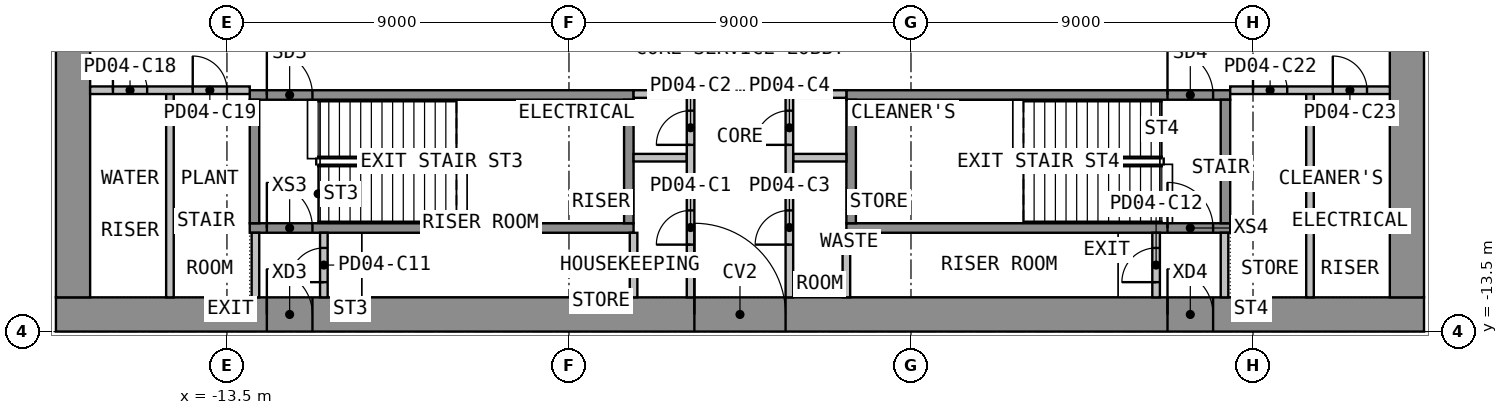
"""IFC4 building model, lengths in metres.
Left out: names, types, materials, properties, quantities, classifications, styles, units other than length and angle.
Written with IfcOpenShell. Run it as: python <this file> out.ifc"""

import sys

from ifc_helpers import new_model, si_unit, direction, frame, frame_2d, origin, place, context, subcontext, project, spatial, rectangle, extrude, element, fill, save


model = new_model("IFC4")
c1 = context("Model", 3, precision=1e-05, world=origin(), true_north=direction((0.0, 1.0)))
c2 = subcontext(c1, "Body", "Model", "MODEL_VIEW")
j1 = project(units=[si_unit("LENGTHUNIT", "METRE"), si_unit("PLANEANGLEUNIT", "RADIAN")], contexts=[c1])
p1 = place(None, origin())
s1 = spatial("IfcSite", under=j1, at=p1, CompositionType="ELEMENT")
p2 = place(p1, origin())
s2 = spatial("IfcBuilding", under=s1, at=p2, CompositionType="ELEMENT")
p3 = place(p2, frame((0.0, 0.0, 20.4)))
s3 = spatial("IfcBuildingStorey", under=s2, at=p3, CompositionType="ELEMENT", Elevation=20.4)
p4 = place(p3, frame((-18.0, -13.05, 0.0), z_axis=(0.0, 0.0, 1.0), x_axis=(1.0, 0.0, 0.0)))
e1 = element("IfcWall", 1, at=p4, inside=s3, PredefinedType="SHEAR", context=c2, shape_type="SweptSolid", body=[
    extrude(rectangle(XDim=36.0, YDim=0.9, at=frame_2d((18.0, 0.0))), origin(), (0.0, 0.0, 1.0), 4.4),
])
p5 = place(p4, frame((16.8, 0.0, 0.0)))
e2 = element("IfcOpeningElement", 2, at=p5, cuts=e1, PredefinedType="OPENING", context=c2, shape_type="SweptSolid", body=[
    extrude(rectangle(XDim=2.4, YDim=2.1, at=frame_2d((1.2, 1.05))), frame((0.0, 0.46, 0.0), z_axis=(0.0, -1.0, 0.0), x_axis=(1.0, 0.0, 0.0)), (0.0, 0.0, 1.0), 0.92),
])
p6 = place(p4, frame((5.55, 0.0, 0.0)))
e3 = element("IfcOpeningElement", 3, at=p6, cuts=e1, PredefinedType="OPENING", context=c2, shape_type="SweptSolid", body=[
    extrude(rectangle(XDim=1.2, YDim=2.1, at=frame_2d((0.6, 1.05))), frame((0.0, 0.46, 0.0), z_axis=(0.0, -1.0, 0.0), x_axis=(1.0, 0.0, 0.0)), (0.0, 0.0, 1.0), 0.92),
])
p7 = place(p4, frame((29.25, 0.0, 0.0)))
e4 = element("IfcOpeningElement", 4, at=p7, cuts=e1, PredefinedType="OPENING", context=c2, shape_type="SweptSolid", body=[
    extrude(rectangle(XDim=1.2, YDim=2.1, at=frame_2d((0.6, 1.05))), frame((0.0, 0.46, 0.0), z_axis=(0.0, -1.0, 0.0), x_axis=(1.0, 0.0, 0.0)), (0.0, 0.0, 1.0), 0.92),
])
p8 = place(p3, frame((-17.55, -12.6, 0.0), z_axis=(0.0, 0.0, 1.0), x_axis=(0.0, 1.0, 0.0)))
e5 = element("IfcWall", 5, at=p8, inside=s3, PredefinedType="SHEAR", context=c2, shape_type="SweptSolid", body=[
    extrude(rectangle(XDim=25.2, YDim=0.9, at=frame_2d((12.6, 0.0))), origin(), (0.0, 0.0, 1.0), 4.4),
])
p9 = place(p8, frame((11.4, 0.0, 0.0)))
e6 = element("IfcOpeningElement", 6, at=p9, cuts=e5, PredefinedType="OPENING", context=c2, shape_type="SweptSolid", body=[
    extrude(rectangle(XDim=2.4, YDim=2.1, at=frame_2d((1.2, 1.05))), frame((0.0, 0.46, 0.0), z_axis=(0.0, -1.0, 0.0), x_axis=(1.0, 0.0, 0.0)), (0.0, 0.0, 1.0), 0.92),
])
p10 = place(p3, frame((17.55, -12.6, 0.0), z_axis=(0.0, 0.0, 1.0), x_axis=(0.0, 1.0, 0.0)))
e7 = element("IfcWall", 7, at=p10, inside=s3, PredefinedType="SHEAR", context=c2, shape_type="SweptSolid", body=[
    extrude(rectangle(XDim=25.2, YDim=0.9, at=frame_2d((12.6, 0.0))), origin(), (0.0, 0.0, 1.0), 4.4),
])
p11 = place(p10, frame((11.4, 0.0, 0.0)))
e8 = element("IfcOpeningElement", 8, at=p11, cuts=e7, PredefinedType="OPENING", context=c2, shape_type="SweptSolid", body=[
    extrude(rectangle(XDim=2.4, YDim=2.1, at=frame_2d((1.2, 1.05))), frame((0.0, 0.46, 0.0), z_axis=(0.0, -1.0, 0.0), x_axis=(1.0, 0.0, 0.0)), (0.0, 0.0, 1.0), 0.92),
])
p12 = place(p3, frame((-12.9, -10.775, 0.0), z_axis=(0.0, 0.0, 1.0), x_axis=(1.0, 0.0, 0.0)))
e9 = element("IfcWall", 9, at=p12, inside=s3, PredefinedType="SHEAR", context=c2, shape_type="SweptSolid", body=[
    extrude(rectangle(XDim=10.1, YDim=0.25, at=frame_2d((5.05, 0.0))), origin(), (0.0, 0.0, 1.0), 4.4),
])
p13 = place(p12, frame((0.45, 0.0, 0.0)))
e10 = element("IfcOpeningElement", 10, at=p13, cuts=e9, PredefinedType="OPENING", context=c2, shape_type="SweptSolid", body=[
    extrude(rectangle(XDim=1.2, YDim=2.1, at=frame_2d((0.6, 1.05))), frame((0.0, 0.135, 0.0), z_axis=(0.0, -1.0, 0.0), x_axis=(1.0, 0.0, 0.0)), (0.0, 0.0, 1.0), 0.27),
])
p14 = place(p3, frame((-12.9, -7.275, 0.0), z_axis=(0.0, 0.0, 1.0), x_axis=(1.0, 0.0, 0.0)))
e11 = element("IfcWall", 11, at=p14, inside=s3, PredefinedType="SHEAR", context=c2, shape_type="SweptSolid", body=[
    extrude(rectangle(XDim=10.1, YDim=0.25, at=frame_2d((5.05, 0.0))), origin(), (0.0, 0.0, 1.0), 4.4),
])
p15 = place(p14, frame((0.45, 0.0, 0.0)))
e12 = element("IfcOpeningElement", 12, at=p15, cuts=e11, PredefinedType="OPENING", context=c2, shape_type="SweptSolid", body=[
    extrude(rectangle(XDim=1.2, YDim=2.1, at=frame_2d((0.6, 1.05))), frame((0.0, 0.135, 0.0), z_axis=(0.0, -1.0, 0.0), x_axis=(1.0, 0.0, 0.0)), (0.0, 0.0, 1.0), 0.27),
])
for number, where, z_axis, x_axis in (
    (13, (-12.775, -10.65, 0.0), (0.0, 0.0, 1.0), (0.0, 1.0, 0.0)),
    (14, (-2.925, -10.65, 0.0), (0.0, 0.0, 1.0), (0.0, 1.0, 0.0)),
):
    element("IfcWall", number, at=place(p3, frame(where, z_axis=z_axis, x_axis=x_axis)), inside=s3, PredefinedType="SHEAR", context=c2, shape_type="SweptSolid", body=[
        extrude(rectangle(XDim=3.25, YDim=0.25, at=frame_2d((1.625, 0.0))), origin(), (0.0, 0.0, 1.0), 4.4),
    ])
p16 = place(p3, frame((2.8, -10.775, 0.0), z_axis=(0.0, 0.0, 1.0), x_axis=(1.0, 0.0, 0.0)))
e15 = element("IfcWall", 15, at=p16, inside=s3, PredefinedType="SHEAR", context=c2, shape_type="SweptSolid", body=[
    extrude(rectangle(XDim=10.1, YDim=0.25, at=frame_2d((5.05, 0.0))), origin(), (0.0, 0.0, 1.0), 4.4),
])
p17 = place(p16, frame((8.45, 0.0, 0.0)))
e16 = element("IfcOpeningElement", 16, at=p17, cuts=e15, PredefinedType="OPENING", context=c2, shape_type="SweptSolid", body=[
    extrude(rectangle(XDim=1.2, YDim=2.1, at=frame_2d((0.6, 1.05))), frame((0.0, 0.135, 0.0), z_axis=(0.0, -1.0, 0.0), x_axis=(1.0, 0.0, 0.0)), (0.0, 0.0, 1.0), 0.27),
])
p18 = place(p3, frame((2.8, -7.275, 0.0), z_axis=(0.0, 0.0, 1.0), x_axis=(1.0, 0.0, 0.0)))
e17 = element("IfcWall", 17, at=p18, inside=s3, PredefinedType="SHEAR", context=c2, shape_type="SweptSolid", body=[
    extrude(rectangle(XDim=10.1, YDim=0.25, at=frame_2d((5.05, 0.0))), origin(), (0.0, 0.0, 1.0), 4.4),
])
p19 = place(p18, frame((8.45, 0.0, 0.0)))
e18 = element("IfcOpeningElement", 18, at=p19, cuts=e17, PredefinedType="OPENING", context=c2, shape_type="SweptSolid", body=[
    extrude(rectangle(XDim=1.2, YDim=2.1, at=frame_2d((0.6, 1.05))), frame((0.0, 0.135, 0.0), z_axis=(0.0, -1.0, 0.0), x_axis=(1.0, 0.0, 0.0)), (0.0, 0.0, 1.0), 0.27),
])
for number, where, z_axis, x_axis in (
    (19, (2.925, -10.65, 0.0), (0.0, 0.0, 1.0), (0.0, 1.0, 0.0)),
    (20, (12.775, -10.65, 0.0), (0.0, 0.0, 1.0), (0.0, 1.0, 0.0)),
):
    element("IfcWall", number, at=place(p3, frame(where, z_axis=z_axis, x_axis=x_axis)), inside=s3, PredefinedType="SHEAR", context=c2, shape_type="SweptSolid", body=[
        extrude(rectangle(XDim=3.25, YDim=0.25, at=frame_2d((1.625, 0.0))), origin(), (0.0, 0.0, 1.0), 4.4),
    ])
for number, where, z_axis, x_axis in (
    (21, (-2.8, -7.25, 0.0), (0.0, 0.0, 1.0), (1.0, 0.0, 0.0)),
    (22, (-2.8, -8.925, 0.0), (0.0, 0.0, 1.0), (1.0, 0.0, 0.0)),
    (23, (1.4, -7.25, 0.0), (0.0, 0.0, 1.0), (1.0, 0.0, 0.0)),
    (24, (1.4, -8.925, 0.0), (0.0, 0.0, 1.0), (1.0, 0.0, 0.0)),
):
    element("IfcWall", number, at=place(p3, frame(where, z_axis=z_axis, x_axis=x_axis)), inside=s3, PredefinedType="PARTITIONING", context=c2, shape_type="SweptSolid", body=[
        extrude(rectangle(XDim=1.4, YDim=0.2, at=frame_2d((0.7, 0.0))), origin(), (0.0, 0.0, 1.0), 4.4),
    ])
p20 = place(p3, frame((-1.3, -12.6, 0.0), z_axis=(0.0, 0.0, 1.0), x_axis=(0.0, 1.0, 0.0)))
e25 = element("IfcWall", 25, at=p20, inside=s3, PredefinedType="PARTITIONING", context=c2, shape_type="SweptSolid", body=[
    extrude(rectangle(XDim=5.45, YDim=0.2, at=frame_2d((2.725, 0.0))), origin(), (0.0, 0.0, 1.0), 4.4),
])
p21 = place(p20, frame((1.387, 0.0, 0.0)))
e26 = element("IfcOpeningElement", 26, at=p21, cuts=e25, PredefinedType="OPENING", context=c2, shape_type="SweptSolid", body=[
    extrude(rectangle(XDim=0.9, YDim=2.1, at=frame_2d((0.45, 1.05))), frame((0.0, 0.11, 0.0), z_axis=(0.0, -1.0, 0.0), x_axis=(1.0, 0.0, 0.0)), (0.0, 0.0, 1.0), 0.22),
])
p22 = place(p20, frame((4.012, 0.0, 0.0)))
e27 = element("IfcOpeningElement", 27, at=p22, cuts=e25, PredefinedType="OPENING", context=c2, shape_type="SweptSolid", body=[
    extrude(rectangle(XDim=0.9, YDim=2.1, at=frame_2d((0.45, 1.05))), frame((0.0, 0.11, 0.0), z_axis=(0.0, -1.0, 0.0), x_axis=(1.0, 0.0, 0.0)), (0.0, 0.0, 1.0), 0.22),
])
p23 = place(p3, frame((1.3, -12.6, 0.0), z_axis=(0.0, 0.0, 1.0), x_axis=(0.0, 1.0, 0.0)))
e28 = element("IfcWall", 28, at=p23, inside=s3, PredefinedType="PARTITIONING", context=c2, shape_type="SweptSolid", body=[
    extrude(rectangle(XDim=5.45, YDim=0.2, at=frame_2d((2.725, 0.0))), origin(), (0.0, 0.0, 1.0), 4.4),
])
p24 = place(p23, frame((1.387, 0.0, 0.0)))
e29 = element("IfcOpeningElement", 29, at=p24, cuts=e28, PredefinedType="OPENING", context=c2, shape_type="SweptSolid", body=[
    extrude(rectangle(XDim=0.9, YDim=2.1, at=frame_2d((0.45, 1.05))), frame((0.0, 0.11, 0.0), z_axis=(0.0, -1.0, 0.0), x_axis=(1.0, 0.0, 0.0)), (0.0, 0.0, 1.0), 0.22),
])
p25 = place(p23, frame((4.012, 0.0, 0.0)))
e30 = element("IfcOpeningElement", 30, at=p25, cuts=e28, PredefinedType="OPENING", context=c2, shape_type="SweptSolid", body=[
    extrude(rectangle(XDim=0.9, YDim=2.1, at=frame_2d((0.45, 1.05))), frame((0.0, 0.11, 0.0), z_axis=(0.0, -1.0, 0.0), x_axis=(1.0, 0.0, 0.0)), (0.0, 0.0, 1.0), 0.22),
])
p26 = place(p3, frame((-12.75, -12.6, 0.0), z_axis=(0.0, 0.0, 1.0), x_axis=(0.0, 1.0, 0.0)))
e31 = element("IfcWall", 31, at=p26, inside=s3, PredefinedType="PARTITIONING", context=c2, shape_type="SweptSolid", body=[
    extrude(rectangle(XDim=1.7, YDim=0.2, at=frame_2d((0.85, 0.0))), origin(), (0.0, 0.0, 1.0), 4.4),
])
p27 = place(p3, frame((-10.95, -12.6, 0.0), z_axis=(0.0, 0.0, 1.0), x_axis=(0.0, 1.0, 0.0)))
e32 = element("IfcWall", 32, at=p27, inside=s3, PredefinedType="PARTITIONING", context=c2, shape_type="SweptSolid", body=[
    extrude(rectangle(XDim=1.7, YDim=0.2, at=frame_2d((0.85, 0.0))), origin(), (0.0, 0.0, 1.0), 4.4),
])
p28 = place(p27, frame((0.4, 0.0, 0.0)))
e33 = element("IfcOpeningElement", 33, at=p28, cuts=e32, PredefinedType="OPENING", context=c2, shape_type="SweptSolid", body=[
    extrude(rectangle(XDim=0.9, YDim=2.1, at=frame_2d((0.45, 1.05))), frame((0.0, 0.11, 0.0), z_axis=(0.0, -1.0, 0.0), x_axis=(1.0, 0.0, 0.0)), (0.0, 0.0, 1.0), 0.22),
])
p29 = place(p3, frame((12.75, -12.6, 0.0), z_axis=(0.0, 0.0, 1.0), x_axis=(0.0, 1.0, 0.0)))
e34 = element("IfcWall", 34, at=p29, inside=s3, PredefinedType="PARTITIONING", context=c2, shape_type="SweptSolid", body=[
    extrude(rectangle(XDim=1.7, YDim=0.2, at=frame_2d((0.85, 0.0))), origin(), (0.0, 0.0, 1.0), 4.4),
])
p30 = place(p3, frame((10.95, -12.6, 0.0), z_axis=(0.0, 0.0, 1.0), x_axis=(0.0, 1.0, 0.0)))
e35 = element("IfcWall", 35, at=p30, inside=s3, PredefinedType="PARTITIONING", context=c2, shape_type="SweptSolid", body=[
    extrude(rectangle(XDim=1.7, YDim=0.2, at=frame_2d((0.85, 0.0))), origin(), (0.0, 0.0, 1.0), 4.4),
])
p31 = place(p30, frame((0.4, 0.0, 0.0)))
e36 = element("IfcOpeningElement", 36, at=p31, cuts=e35, PredefinedType="OPENING", context=c2, shape_type="SweptSolid", body=[
    extrude(rectangle(XDim=0.9, YDim=2.1, at=frame_2d((0.45, 1.05))), frame((0.0, 0.11, 0.0), z_axis=(0.0, -1.0, 0.0), x_axis=(1.0, 0.0, 0.0)), (0.0, 0.0, 1.0), 0.22),
])
p32 = place(p3, frame((-15.0, -12.6, 0.0), z_axis=(0.0, 0.0, 1.0), x_axis=(0.0, 1.0, 0.0)))
e37 = element("IfcWall", 37, at=p32, inside=s3, PredefinedType="PARTITIONING", context=c2, shape_type="SweptSolid", body=[
    extrude(rectangle(XDim=5.45, YDim=0.2, at=frame_2d((2.725, 0.0))), origin(), (0.0, 0.0, 1.0), 4.4),
])
p33 = place(p3, frame((-17.1, -7.15, 0.0), z_axis=(0.0, 0.0, 1.0), x_axis=(1.0, 0.0, 0.0)))
e38 = element("IfcWall", 38, at=p33, inside=s3, PredefinedType="PARTITIONING", context=c2, shape_type="SweptSolid", body=[
    extrude(rectangle(XDim=4.2, YDim=0.2, at=frame_2d((2.1, 0.0))), origin(), (0.0, 0.0, 1.0), 4.4),
])
p34 = place(p33, frame((0.6, 0.0, 0.0)))
e39 = element("IfcOpeningElement", 39, at=p34, cuts=e38, PredefinedType="OPENING", context=c2, shape_type="SweptSolid", body=[
    extrude(rectangle(XDim=0.9, YDim=2.1, at=frame_2d((0.45, 1.05))), frame((0.0, 0.11, 0.0), z_axis=(0.0, -1.0, 0.0), x_axis=(1.0, 0.0, 0.0)), (0.0, 0.0, 1.0), 0.22),
])
p35 = place(p33, frame((2.7, 0.0, 0.0)))
e40 = element("IfcOpeningElement", 40, at=p35, cuts=e38, PredefinedType="OPENING", context=c2, shape_type="SweptSolid", body=[
    extrude(rectangle(XDim=0.9, YDim=2.1, at=frame_2d((0.45, 1.05))), frame((0.0, 0.11, 0.0), z_axis=(0.0, -1.0, 0.0), x_axis=(1.0, 0.0, 0.0)), (0.0, 0.0, 1.0), 0.22),
])
p36 = place(p3, frame((15.0, -12.6, 0.0), z_axis=(0.0, 0.0, 1.0), x_axis=(0.0, 1.0, 0.0)))
e41 = element("IfcWall", 41, at=p36, inside=s3, PredefinedType="PARTITIONING", context=c2, shape_type="SweptSolid", body=[
    extrude(rectangle(XDim=5.45, YDim=0.2, at=frame_2d((2.725, 0.0))), origin(), (0.0, 0.0, 1.0), 4.4),
])
p37 = place(p3, frame((12.9, -7.15, 0.0), z_axis=(0.0, 0.0, 1.0), x_axis=(1.0, 0.0, 0.0)))
e42 = element("IfcWall", 42, at=p37, inside=s3, PredefinedType="PARTITIONING", context=c2, shape_type="SweptSolid", body=[
    extrude(rectangle(XDim=4.2, YDim=0.2, at=frame_2d((2.1, 0.0))), origin(), (0.0, 0.0, 1.0), 4.4),
])
p38 = place(p37, frame((0.6, 0.0, 0.0)))
e43 = element("IfcOpeningElement", 43, at=p38, cuts=e42, PredefinedType="OPENING", context=c2, shape_type="SweptSolid", body=[
    extrude(rectangle(XDim=0.9, YDim=2.1, at=frame_2d((0.45, 1.05))), frame((0.0, 0.11, 0.0), z_axis=(0.0, -1.0, 0.0), x_axis=(1.0, 0.0, 0.0)), (0.0, 0.0, 1.0), 0.22),
])
p39 = place(p37, frame((2.7, 0.0, 0.0)))
e44 = element("IfcOpeningElement", 44, at=p39, cuts=e42, PredefinedType="OPENING", context=c2, shape_type="SweptSolid", body=[
    extrude(rectangle(XDim=0.9, YDim=2.1, at=frame_2d((0.45, 1.05))), frame((0.0, 0.11, 0.0), z_axis=(0.0, -1.0, 0.0), x_axis=(1.0, 0.0, 0.0)), (0.0, 0.0, 1.0), 0.22),
])
for number, where, z_axis, x_axis in (
    (45, (-2.8, -12.599, 0.0), (0.0, 0.0, 1.0), (0.0, 1.0, 0.0)),
    (46, (2.8, -10.901, 0.0), (0.0, 0.0, 1.0), (0.0, -1.0, 0.0)),
):
    element("IfcWall", number, at=place(p3, frame(where, z_axis=z_axis, x_axis=x_axis)), inside=s3, PredefinedType="PARTITIONING", context=c2, shape_type="SweptSolid", body=[
        extrude(rectangle(XDim=1.698, YDim=0.2, at=frame_2d((0.849, 0.0))), origin(), (0.0, 0.0, 1.0), 4.4),
    ])
p40 = place(p5, origin())
e47 = element("IfcDoor", 47, at=p40, inside=s3, OperationType="DOUBLE_DOOR_DOUBLE_SWING", PredefinedType="DOOR", context=c2, shape_type="SweptSolid", body=[
    extrude(rectangle(XDim=2.4, YDim=2.1, at=frame_2d((1.2, 1.05))), frame((0.0, 0.025, 0.0), z_axis=(0.0, -1.0, 0.0), x_axis=(1.0, 0.0, 0.0)), (0.0, 0.0, 1.0), 0.05),
])
fill(e2, e47)
p41 = place(p6, origin())
e48 = element("IfcDoor", 48, at=p41, inside=s3, OperationType="SINGLE_SWING_RIGHT", PredefinedType="DOOR", context=c2, shape_type="SweptSolid", body=[
    extrude(rectangle(XDim=1.2, YDim=2.1, at=frame_2d((0.6, 1.05))), frame((0.0, 0.025, 0.0), z_axis=(0.0, -1.0, 0.0), x_axis=(1.0, 0.0, 0.0)), (0.0, 0.0, 1.0), 0.05),
])
fill(e3, e48)
p42 = place(p7, origin())
e49 = element("IfcDoor", 49, at=p42, inside=s3, OperationType="SINGLE_SWING_RIGHT", PredefinedType="DOOR", context=c2, shape_type="SweptSolid", body=[
    extrude(rectangle(XDim=1.2, YDim=2.1, at=frame_2d((0.6, 1.05))), frame((0.0, 0.025, 0.0), z_axis=(0.0, -1.0, 0.0), x_axis=(1.0, 0.0, 0.0)), (0.0, 0.0, 1.0), 0.05),
])
fill(e4, e49)
p43 = place(p15, origin())
e50 = element("IfcDoor", 50, at=p43, inside=s3, OperationType="SINGLE_SWING_LEFT", PredefinedType="DOOR", context=c2, shape_type="SweptSolid", body=[
    extrude(rectangle(XDim=1.2, YDim=2.1, at=frame_2d((0.6, 1.05))), frame((0.0, 0.025, 0.0), z_axis=(0.0, -1.0, 0.0), x_axis=(1.0, 0.0, 0.0)), (0.0, 0.0, 1.0), 0.05),
])
fill(e12, e50)
p44 = place(p19, origin())
e51 = element("IfcDoor", 51, at=p44, inside=s3, OperationType="SINGLE_SWING_LEFT", PredefinedType="DOOR", context=c2, shape_type="SweptSolid", body=[
    extrude(rectangle(XDim=1.2, YDim=2.1, at=frame_2d((0.6, 1.05))), frame((0.0, 0.025, 0.0), z_axis=(0.0, -1.0, 0.0), x_axis=(1.0, 0.0, 0.0)), (0.0, 0.0, 1.0), 0.05),
])
fill(e18, e51)
p45 = place(p21, origin())
e52 = element("IfcDoor", 52, at=p45, inside=s3, OperationType="SINGLE_SWING_LEFT", PredefinedType="DOOR", context=c2, shape_type="SweptSolid", body=[
    extrude(rectangle(XDim=0.9, YDim=2.1, at=frame_2d((0.45, 1.05))), frame((0.0, 0.025, 0.0), z_axis=(0.0, -1.0, 0.0), x_axis=(1.0, 0.0, 0.0)), (0.0, 0.0, 1.0), 0.05),
])
fill(e26, e52)
p46 = place(p22, origin())
e53 = element("IfcDoor", 53, at=p46, inside=s3, OperationType="SINGLE_SWING_LEFT", PredefinedType="DOOR", context=c2, shape_type="SweptSolid", body=[
    extrude(rectangle(XDim=0.9, YDim=2.1, at=frame_2d((0.45, 1.05))), frame((0.0, 0.025, 0.0), z_axis=(0.0, -1.0, 0.0), x_axis=(1.0, 0.0, 0.0)), (0.0, 0.0, 1.0), 0.05),
])
fill(e27, e53)
p47 = place(p24, origin())
e54 = element("IfcDoor", 54, at=p47, inside=s3, OperationType="SINGLE_SWING_LEFT", PredefinedType="DOOR", context=c2, shape_type="SweptSolid", body=[
    extrude(rectangle(XDim=0.9, YDim=2.1, at=frame_2d((0.45, 1.05))), frame((0.0, 0.025, 0.0), z_axis=(0.0, -1.0, 0.0), x_axis=(1.0, 0.0, 0.0)), (0.0, 0.0, 1.0), 0.05),
])
fill(e29, e54)
p48 = place(p25, origin())
e55 = element("IfcDoor", 55, at=p48, inside=s3, OperationType="SINGLE_SWING_LEFT", PredefinedType="DOOR", context=c2, shape_type="SweptSolid", body=[
    extrude(rectangle(XDim=0.9, YDim=2.1, at=frame_2d((0.45, 1.05))), frame((0.0, 0.025, 0.0), z_axis=(0.0, -1.0, 0.0), x_axis=(1.0, 0.0, 0.0)), (0.0, 0.0, 1.0), 0.05),
])
fill(e30, e55)
p49 = place(p13, origin())
e56 = element("IfcDoor", 56, at=p49, inside=s3, OperationType="SINGLE_SWING_RIGHT", PredefinedType="DOOR", context=c2, shape_type="SweptSolid", body=[
    extrude(rectangle(XDim=1.2, YDim=2.1, at=frame_2d((0.6, 1.05))), frame((0.0, 0.025, 0.0), z_axis=(0.0, -1.0, 0.0), x_axis=(1.0, 0.0, 0.0)), (0.0, 0.0, 1.0), 0.05),
])
fill(e10, e56)
p50 = place(p28, origin())
e57 = element("IfcDoor", 57, at=p50, inside=s3, OperationType="SINGLE_SWING_LEFT", PredefinedType="DOOR", context=c2, shape_type="SweptSolid", body=[
    extrude(rectangle(XDim=0.9, YDim=2.1, at=frame_2d((0.45, 1.05))), frame((0.0, 0.025, 0.0), z_axis=(0.0, -1.0, 0.0), x_axis=(1.0, 0.0, 0.0)), (0.0, 0.0, 1.0), 0.05),
])
fill(e33, e57)
p51 = place(p17, origin())
e58 = element("IfcDoor", 58, at=p51, inside=s3, OperationType="SINGLE_SWING_RIGHT", PredefinedType="DOOR", context=c2, shape_type="SweptSolid", body=[
    extrude(rectangle(XDim=1.2, YDim=2.1, at=frame_2d((0.6, 1.05))), frame((0.0, 0.025, 0.0), z_axis=(0.0, -1.0, 0.0), x_axis=(1.0, 0.0, 0.0)), (0.0, 0.0, 1.0), 0.05),
])
fill(e16, e58)
p52 = place(p31, origin())
e59 = element("IfcDoor", 59, at=p52, inside=s3, OperationType="SINGLE_SWING_LEFT", PredefinedType="DOOR", context=c2, shape_type="SweptSolid", body=[
    extrude(rectangle(XDim=0.9, YDim=2.1, at=frame_2d((0.45, 1.05))), frame((0.0, 0.025, 0.0), z_axis=(0.0, -1.0, 0.0), x_axis=(1.0, 0.0, 0.0)), (0.0, 0.0, 1.0), 0.05),
])
fill(e36, e59)
p53 = place(p34, origin())
e60 = element("IfcDoor", 60, at=p53, inside=s3, OperationType="SINGLE_SWING_LEFT", PredefinedType="DOOR", context=c2, shape_type="SweptSolid", body=[
    extrude(rectangle(XDim=0.9, YDim=2.1, at=frame_2d((0.45, 1.05))), frame((0.0, 0.025, 0.0), z_axis=(0.0, -1.0, 0.0), x_axis=(1.0, 0.0, 0.0)), (0.0, 0.0, 1.0), 0.05),
])
fill(e39, e60)
p54 = place(p35, origin())
e61 = element("IfcDoor", 61, at=p54, inside=s3, OperationType="SINGLE_SWING_LEFT", PredefinedType="DOOR", context=c2, shape_type="SweptSolid", body=[
    extrude(rectangle(XDim=0.9, YDim=2.1, at=frame_2d((0.45, 1.05))), frame((0.0, 0.025, 0.0), z_axis=(0.0, -1.0, 0.0), x_axis=(1.0, 0.0, 0.0)), (0.0, 0.0, 1.0), 0.05),
])
fill(e40, e61)
p55 = place(p38, origin())
e62 = element("IfcDoor", 62, at=p55, inside=s3, OperationType="SINGLE_SWING_LEFT", PredefinedType="DOOR", context=c2, shape_type="SweptSolid", body=[
    extrude(rectangle(XDim=0.9, YDim=2.1, at=frame_2d((0.45, 1.05))), frame((0.0, 0.025, 0.0), z_axis=(0.0, -1.0, 0.0), x_axis=(1.0, 0.0, 0.0)), (0.0, 0.0, 1.0), 0.05),
])
fill(e43, e62)
p56 = place(p39, origin())
e63 = element("IfcDoor", 63, at=p56, inside=s3, OperationType="SINGLE_SWING_LEFT", PredefinedType="DOOR", context=c2, shape_type="SweptSolid", body=[
    extrude(rectangle(XDim=0.9, YDim=2.1, at=frame_2d((0.45, 1.05))), frame((0.0, 0.025, 0.0), z_axis=(0.0, -1.0, 0.0), x_axis=(1.0, 0.0, 0.0)), (0.0, 0.0, 1.0), 0.05),
])
fill(e44, e63)
save(model, sys.argv[1])
